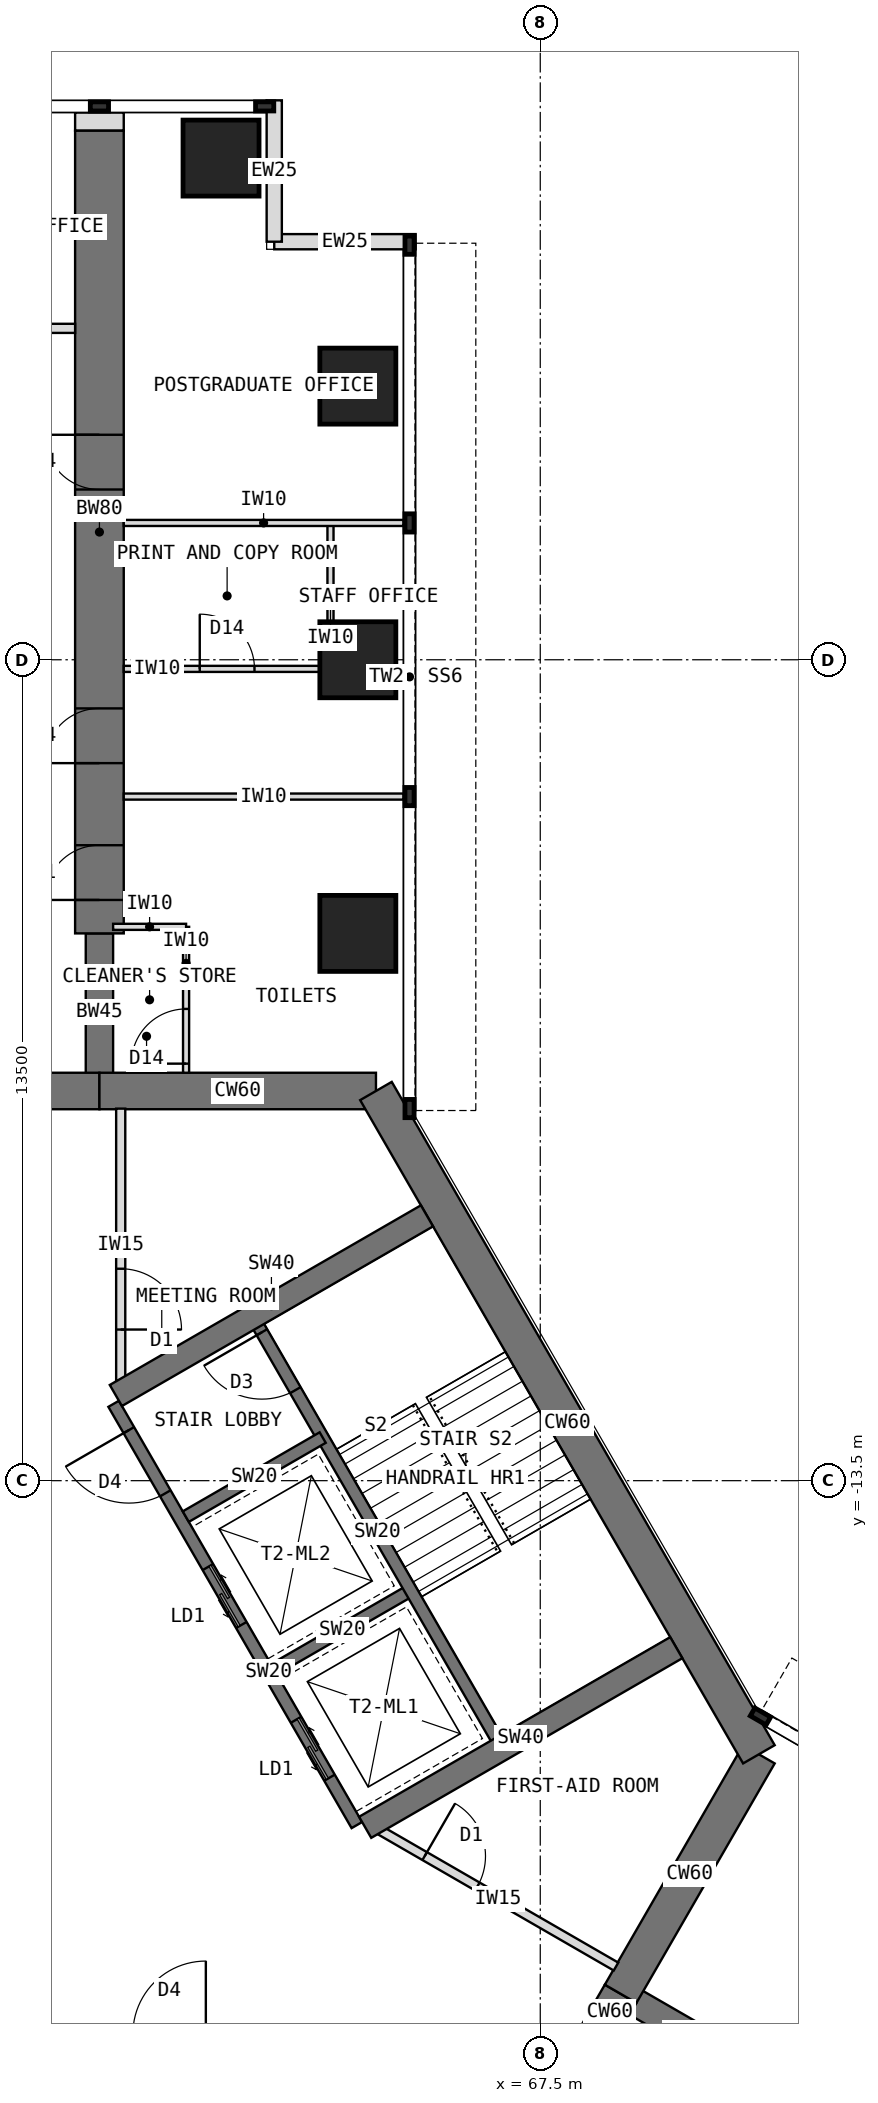
"""IFC4 building model, lengths in metres.
Left out: names, types, materials, properties, quantities, classifications, styles, units other than length and angle.
Written with IfcOpenShell. Run it as: python <this file> out.ifc"""

import sys

from ifc_helpers import new_model, si_unit, direction, frame, frame_2d, origin, origin_2d, place, context, subcontext, project, spatial, rectangle, extrude, element, fill, save


model = new_model("IFC4")
c1 = context("Model", 3, precision=1e-05, world=origin(), true_north=direction((0.0, 1.0)))
c2 = subcontext(c1, "Body", "Model", "MODEL_VIEW")
j1 = project(units=[si_unit("LENGTHUNIT", "METRE"), si_unit("PLANEANGLEUNIT", "RADIAN")], contexts=[c1])
p1 = place(None, origin())
s1 = spatial("IfcSite", under=j1, at=p1, CompositionType="ELEMENT")
p2 = place(p1, origin())
s2 = spatial("IfcBuilding", under=s1, at=p2, CompositionType="ELEMENT")
p3 = place(p2, frame((0.0, 0.0, 161.5)))
s3 = spatial("IfcBuildingStorey", under=s2, at=p3, CompositionType="ELEMENT", Elevation=161.5)
p4 = place(p3, frame((64.798, -7.092, 0.0), z_axis=(0.0, 0.0, 1.0), x_axis=(-1.0, 0.0, 0.0)))
e1 = element("IfcWall", 1, at=p4, inside=s3, PredefinedType="SHEAR", context=c2, shape_type="SweptSolid", body=[
    extrude(rectangle(XDim=4.548, YDim=0.6, at=frame_2d((2.274, 0.0))), origin(), (0.0, 0.0, 1.0), 4.0),
])
p5 = place(p3, frame((60.25, -7.092, 0.0), z_axis=(0.0, 0.0, 1.0), x_axis=(-1.0, 0.0, 0.0)))
e2 = element("IfcWall", 2, at=p5, inside=s3, PredefinedType="SHEAR", context=c2, shape_type="SweptSolid", body=[
    extrude(rectangle(XDim=3.5, YDim=0.6, at=frame_2d((1.75, 0.0))), origin(), (0.0, 0.0, 1.0), 4.0),
])
p6 = place(p5, frame((0.85, 0.0, 0.0)))
e3 = element("IfcOpeningElement", 3, at=p6, cuts=e2, PredefinedType="OPENING", context=c2, shape_type="SweptSolid", body=[
    extrude(rectangle(XDim=1.8, YDim=2.1, at=frame_2d((0.9, 1.05))), frame((0.0, 0.31, 0.0), z_axis=(0.0, -1.0, 0.0), x_axis=(1.0, 0.0, 0.0)), (0.0, 0.0, 1.0), 0.62),
])
p7 = place(p3, frame((67.072, -24.97, 0.0), z_axis=(0.0, 0.0, 1.0), x_axis=(0.500010275428, 0.866019471182, 0.0)))
e4 = element("IfcWall", 4, at=p7, inside=s3, PredefinedType="SHEAR", context=c2, shape_type="SweptSolid", body=[
    extrude(rectangle(XDim=3.5, YDim=0.6, at=frame_2d((1.75, 0.0))), origin(), (0.0, 0.0, 1.0), 4.0),
])
p8 = place(p7, frame((0.85, 0.0, 0.0)))
e5 = element("IfcOpeningElement", 5, at=p8, cuts=e4, PredefinedType="OPENING", context=c2, shape_type="SweptSolid", body=[
    extrude(rectangle(XDim=1.8, YDim=2.1, at=frame_2d((0.9, 1.05))), frame((0.0, 0.31, 0.0), z_axis=(0.0, -1.0, 0.0), x_axis=(1.0, 0.0, 0.0)), (0.0, 0.0, 1.0), 0.62),
])
p9 = place(p3, frame((68.822, -21.939, 0.0), z_axis=(0.0, 0.0, 1.0), x_axis=(0.500024481964, 0.866011268655, 0.0)))
e6 = element("IfcWall", 6, at=p9, inside=s3, PredefinedType="SHEAR", context=c2, shape_type="SweptSolid", body=[
    extrude(rectangle(XDim=4.548, YDim=0.6, at=frame_2d((2.274, 0.0))), origin(), (0.0, 0.0, 1.0), 4.0),
])
p10 = place(p3, frame((71.096, -18.0, 0.0), z_axis=(0.0, 0.0, 1.0), x_axis=(-0.500005998175, 0.866021940709, 0.0)))
e7 = element("IfcWall", 7, at=p10, inside=s3, PredefinedType="SHEAR", context=c2, shape_type="SweptSolid", body=[
    extrude(rectangle(XDim=12.596, YDim=0.6, at=frame_2d((6.298, 0.0))), origin(), (0.0, 0.0, 1.0), 4.0),
])
p11 = place(p3, frame((60.25, -7.092, 0.0), z_axis=(0.0, 0.0, 1.0), x_axis=(0.0, 1.0, 0.0)))
e8 = element("IfcWall", 8, at=p11, inside=s3, PredefinedType="SHEAR", context=c2, shape_type="SweptSolid", body=[
    extrude(rectangle(XDim=2.592, YDim=0.45, at=frame_2d((1.296, 0.0))), origin(), (0.0, 0.0, 1.0), 4.0),
])
p12 = place(p3, frame((60.25, -4.5, 0.0), z_axis=(0.0, 0.0, 1.0), x_axis=(0.0, 1.0, 0.0)))
e9 = element("IfcWall", 9, at=p12, inside=s3, PredefinedType="SHEAR", context=c2, shape_type="SweptSolid", body=[
    extrude(rectangle(XDim=13.2, YDim=0.8, at=frame_2d((6.6, 0.0))), origin(), (0.0, 0.0, 1.0), 4.0),
])
p13 = place(p12, frame((0.55, 0.0, 0.0)))
e10 = element("IfcOpeningElement", 10, at=p13, cuts=e9, PredefinedType="OPENING", context=c2, shape_type="SweptSolid", body=[
    extrude(rectangle(XDim=0.9, YDim=2.1, at=frame_2d((0.45, 1.05))), frame((0.0, 0.41, 0.0), z_axis=(0.0, -1.0, 0.0), x_axis=(1.0, 0.0, 0.0)), (0.0, 0.0, 1.0), 0.82),
])
p14 = place(p12, frame((2.8, 0.0, 0.0)))
e11 = element("IfcOpeningElement", 11, at=p14, cuts=e9, PredefinedType="OPENING", context=c2, shape_type="SweptSolid", body=[
    extrude(rectangle(XDim=0.9, YDim=2.1, at=frame_2d((0.45, 1.05))), frame((0.0, 0.41, 0.0), z_axis=(0.0, -1.0, 0.0), x_axis=(1.0, 0.0, 0.0)), (0.0, 0.0, 1.0), 0.82),
])
p15 = place(p12, frame((7.3, 0.0, 0.0)))
e12 = element("IfcOpeningElement", 12, at=p15, cuts=e9, PredefinedType="OPENING", context=c2, shape_type="SweptSolid", body=[
    extrude(rectangle(XDim=0.9, YDim=2.1, at=frame_2d((0.45, 1.05))), frame((0.0, 0.41, 0.0), z_axis=(0.0, -1.0, 0.0), x_axis=(1.0, 0.0, 0.0)), (0.0, 0.0, 1.0), 0.82),
])
p16 = place(p3, frame((68.822, -21.939, 0.0), z_axis=(0.0, 0.0, 1.0), x_axis=(0.866072649678, -0.499918158782, 0.0)))
e13 = element("IfcWall", 13, at=p16, inside=s3, PredefinedType="SHEAR", context=c2, shape_type="SweptSolid", body=[
    extrude(rectangle(XDim=2.592, YDim=0.45, at=frame_2d((1.296, 0.0))), origin(), (0.0, 0.0, 1.0), 4.0),
])
for number, where, z_axis, x_axis in (
    (14, (64.5, -4.5, 0.0), (0.0, 0.0, 1.0), (1.0, 0.0, 0.0)),
    (15, (64.5, 0.0, 0.0), (0.0, 0.0, 1.0), (1.0, 0.0, 0.0)),
    (16, (64.5, 4.5, 0.0), (0.0, 0.0, 1.0), (1.0, 0.0, 0.0)),
    (17, (62.25, 8.25, 0.0), (0.0, 0.0, 1.0), (1.0, 0.0, 0.0)),
):
    element("IfcColumn", number, at=place(p3, frame(where, z_axis=z_axis, x_axis=x_axis)), inside=s3, PredefinedType="COLUMN", context=c2, shape_type="SweptSolid", body=[
        extrude(rectangle(XDim=1.25, YDim=1.25, at=origin_2d()), origin(), (0.0, 0.0, 1.0), 4.0),
    ])
for number, where, z_axis, x_axis in (
    (18, (65.45, 6.875, 0.0), (0.0, 0.0, 1.0), (-1.0, 0.0, 0.0)),
    (19, (63.125, 6.875, 0.0), (0.0, 0.0, 1.0), (0.0, 1.0, 0.0)),
):
    element("IfcWall", number, at=place(p3, frame(where, z_axis=z_axis, x_axis=x_axis)), inside=s3, PredefinedType="STANDARD", context=c2, shape_type="SweptSolid", body=[
        extrude(rectangle(XDim=2.325, YDim=0.25, at=frame_2d((1.163, 0.0))), origin(), (0.0, 0.0, 1.0), 3.7),
    ])
p17 = place(p3, frame((60.25, 8.7, 0.0), z_axis=(0.0, 0.0, 1.0), x_axis=(0.0, 1.0, 0.0)))
e20 = element("IfcWall", 20, at=p17, inside=s3, PredefinedType="PARTITIONING", context=c2, shape_type="SweptSolid", body=[
    extrude(rectangle(XDim=0.3, YDim=0.8, at=frame_2d((0.15, 0.0))), origin(), (0.0, 0.0, 1.0), 3.7),
])
p18 = place(p3, frame((64.484, -19.164, 0.0), z_axis=(0.0, 0.0, 1.0), x_axis=(-0.49999894854, 0.866026010844, 0.0)))
e21 = element("IfcWall", 21, at=p18, inside=s3, PredefinedType="SHEAR", context=c2, shape_type="SweptSolid", body=[
    extrude(rectangle(XDim=8.0, YDim=0.2, at=frame_2d((4.0, 0.0))), origin(), (0.0, 0.0, 1.0), 4.0),
])
p19 = place(p18, frame((6.3, 0.0, 0.0)))
e22 = element("IfcOpeningElement", 22, at=p19, cuts=e21, PredefinedType="OPENING", context=c2, shape_type="SweptSolid", body=[
    extrude(rectangle(XDim=1.2, YDim=2.1, at=frame_2d((0.6, 1.05))), frame((0.0, 0.11, 0.0), z_axis=(0.0, -1.0, 0.0), x_axis=(1.0, 0.0, 0.0)), (0.0, 0.0, 1.0), 0.22),
])
p20 = place(p18, frame((0.9, 0.0, 0.0)))
e23 = element("IfcOpeningElement", 23, at=p20, cuts=e21, PredefinedType="OPENING", context=c2, shape_type="SweptSolid", body=[
    extrude(rectangle(XDim=1.1, YDim=2.2, at=frame_2d((0.55, 1.1))), frame((0.0, 0.11, 0.0), z_axis=(0.0, -1.0, 0.0), x_axis=(1.0, 0.0, 0.0)), (0.0, 0.0, 1.0), 0.22),
])
p21 = place(p18, frame((3.8, 0.0, 0.0)))
e24 = element("IfcOpeningElement", 24, at=p21, cuts=e21, PredefinedType="OPENING", context=c2, shape_type="SweptSolid", body=[
    extrude(rectangle(XDim=1.1, YDim=2.2, at=frame_2d((0.55, 1.1))), frame((0.0, 0.11, 0.0), z_axis=(0.0, -1.0, 0.0), x_axis=(1.0, 0.0, 0.0)), (0.0, 0.0, 1.0), 0.22),
])
p22 = place(p3, frame((63.12, -16.603, 0.0), z_axis=(0.0, 0.0, 1.0), x_axis=(0.866062058628, 0.499936506574, 0.0)))
e25 = element("IfcWall", 25, at=p22, inside=s3, PredefinedType="SHEAR", context=c2, shape_type="SweptSolid", body=[
    extrude(rectangle(XDim=2.6, YDim=0.2, at=frame_2d((1.3, 0.0))), origin(), (0.0, 0.0, 1.0), 4.0),
])
p23 = place(p3, frame((61.67, -14.091, 0.0), z_axis=(0.0, 0.0, 1.0), x_axis=(0.86603858612, 0.49997716683, 0.0)))
e26 = element("IfcWall", 26, at=p23, inside=s3, PredefinedType="SHEAR", context=c2, shape_type="SweptSolid", body=[
    extrude(rectangle(XDim=2.6, YDim=0.2, at=frame_2d((1.3, 0.0))), origin(), (0.0, 0.0, 1.0), 4.0),
])
p24 = place(p3, frame((66.822, -17.814, 0.0), z_axis=(0.0, 0.0, 1.0), x_axis=(-0.49999894854, 0.866026010844, 0.0)))
e27 = element("IfcWall", 27, at=p24, inside=s3, PredefinedType="SHEAR", context=c2, shape_type="SweptSolid", body=[
    extrude(rectangle(XDim=8.0, YDim=0.2, at=frame_2d((4.0, 0.0))), origin(), (0.0, 0.0, 1.0), 4.0),
])
p25 = place(p24, frame((6.7, 0.0, 0.0)))
e28 = element("IfcOpeningElement", 28, at=p25, cuts=e27, PredefinedType="OPENING", context=c2, shape_type="SweptSolid", body=[
    extrude(rectangle(XDim=1.1, YDim=2.1, at=frame_2d((0.55, 1.05))), frame((0.0, 0.11, 0.0), z_axis=(0.0, -1.0, 0.0), x_axis=(1.0, 0.0, 0.0)), (0.0, 0.0, 1.0), 0.22),
])
p26 = place(p3, frame((60.52, -12.099, 0.0), z_axis=(0.0, 0.0, 1.0), x_axis=(0.866009424208, 0.500027676417, 0.0)))
e29 = element("IfcWall", 29, at=p26, inside=s3, PredefinedType="SHEAR", context=c2, shape_type="SweptSolid", body=[
    extrude(rectangle(XDim=5.908, YDim=0.4, at=frame_2d((2.954, 0.0))), origin(), (0.0, 0.0, 1.0), 4.0),
])
p27 = place(p3, frame((64.62, -19.201, 0.0), z_axis=(0.0, 0.0, 1.0), x_axis=(0.866027317282, 0.49999668571, 0.0)))
e30 = element("IfcWall", 30, at=p27, inside=s3, PredefinedType="SHEAR", context=c2, shape_type="SweptSolid", body=[
    extrude(rectangle(XDim=5.908, YDim=0.4, at=frame_2d((2.954, 0.0))), origin(), (0.0, 0.0, 1.0), 4.0),
])
for number, where, z_axis, x_axis in (
    (31, (60.65, -2.25, 0.0), (0.0, 0.0, 1.0), (1.0, 0.0, 0.0)),
    (32, (60.65, 2.25, 0.0), (0.0, 0.0, 1.0), (1.0, 0.0, 0.0)),
):
    element("IfcWall", number, at=place(p3, frame(where, z_axis=z_axis, x_axis=x_axis)), inside=s3, PredefinedType="PARTITIONING", context=c2, shape_type="SweptSolid", body=[
        extrude(rectangle(XDim=4.6, YDim=0.1, at=frame_2d((2.3, 0.0))), origin(), (0.0, 0.0, 1.0), 3.7),
    ])
p28 = place(p3, frame((64.05, -0.15, 0.0), z_axis=(0.0, 0.0, 1.0), x_axis=(0.0, 1.0, 0.0)))
e33 = element("IfcWall", 33, at=p28, inside=s3, PredefinedType="PARTITIONING", context=c2, shape_type="SweptSolid", body=[
    extrude(rectangle(XDim=2.4, YDim=0.1, at=frame_2d((1.2, 0.0))), origin(), (0.0, 0.0, 1.0), 3.7),
])
p29 = place(p3, frame((60.65, -0.15, 0.0), z_axis=(0.0, 0.0, 1.0), x_axis=(1.0, 0.0, 0.0)))
e34 = element("IfcWall", 34, at=p29, inside=s3, PredefinedType="PARTITIONING", context=c2, shape_type="SweptSolid", body=[
    extrude(rectangle(XDim=3.4, YDim=0.1, at=frame_2d((1.7, 0.0))), origin(), (0.0, 0.0, 1.0), 3.7),
])
p30 = place(p29, frame((1.25, 0.0, 0.0)))
e35 = element("IfcOpeningElement", 35, at=p30, cuts=e34, PredefinedType="OPENING", context=c2, shape_type="SweptSolid", body=[
    extrude(rectangle(XDim=0.9, YDim=2.1, at=frame_2d((0.45, 1.05))), frame((0.0, 0.06, 0.0), z_axis=(0.0, -1.0, 0.0), x_axis=(1.0, 0.0, 0.0)), (0.0, 0.0, 1.0), 0.12),
])
p31 = place(p3, frame((61.675, -6.792, 0.0), z_axis=(0.0, 0.0, 1.0), x_axis=(0.0, 1.0, 0.0)))
e36 = element("IfcWall", 36, at=p31, inside=s3, PredefinedType="PARTITIONING", context=c2, shape_type="SweptSolid", body=[
    extrude(rectangle(XDim=2.4, YDim=0.1, at=frame_2d((1.2, 0.0))), origin(), (0.0, 0.0, 1.0), 3.7),
])
p32 = place(p31, frame((0.15, 0.0, 0.0)))
e37 = element("IfcOpeningElement", 37, at=p32, cuts=e36, PredefinedType="OPENING", context=c2, shape_type="SweptSolid", body=[
    extrude(rectangle(XDim=0.9, YDim=2.1, at=frame_2d((0.45, 1.05))), frame((0.0, 0.06, 0.0), z_axis=(0.0, -1.0, 0.0), x_axis=(1.0, 0.0, 0.0)), (0.0, 0.0, 1.0), 0.12),
])
p33 = place(p3, frame((60.475, -4.392, 0.0), z_axis=(0.0, 0.0, 1.0), x_axis=(1.0, 0.0, 0.0)))
e38 = element("IfcWall", 38, at=p33, inside=s3, PredefinedType="PARTITIONING", context=c2, shape_type="SweptSolid", body=[
    extrude(rectangle(XDim=1.2, YDim=0.1, at=frame_2d((0.6, 0.0))), origin(), (0.0, 0.0, 1.0), 3.7),
])
p34 = place(p3, frame((60.6, -7.382, 0.0), z_axis=(0.0, 0.0, 1.0), x_axis=(0.0, -1.0, 0.0)))
e39 = element("IfcWall", 39, at=p34, inside=s3, PredefinedType="PARTITIONING", context=c2, shape_type="SweptSolid", body=[
    extrude(rectangle(XDim=4.476, YDim=0.15, at=frame_2d((2.238, 0.0))), origin(), (0.0, 0.0, 1.0), 3.7),
])
p35 = place(p34, frame((2.633, 0.0, 0.0)))
e40 = element("IfcOpeningElement", 40, at=p35, cuts=e39, PredefinedType="OPENING", context=c2, shape_type="SweptSolid", body=[
    extrude(rectangle(XDim=1.0, YDim=2.1, at=frame_2d((0.5, 1.05))), frame((0.0, 0.085, 0.0), z_axis=(0.0, -1.0, 0.0), x_axis=(1.0, 0.0, 0.0)), (0.0, 0.0, 1.0), 0.17),
])
p36 = place(p3, frame((64.87, -19.253, 0.0), z_axis=(0.0, 0.0, 1.0), x_axis=(0.866025707867, -0.499999473313, 0.0)))
e41 = element("IfcWall", 41, at=p36, inside=s3, PredefinedType="PARTITIONING", context=c2, shape_type="SweptSolid", body=[
    extrude(rectangle(XDim=4.476, YDim=0.15, at=frame_2d((2.238, 0.0))), origin(), (0.0, 0.0, 1.0), 3.7),
])
p37 = place(p36, frame((0.843, 0.0, 0.0)))
e42 = element("IfcOpeningElement", 42, at=p37, cuts=e41, PredefinedType="OPENING", context=c2, shape_type="SweptSolid", body=[
    extrude(rectangle(XDim=1.0, YDim=2.1, at=frame_2d((0.5, 1.05))), frame((0.0, 0.085, 0.0), z_axis=(0.0, -1.0, 0.0), x_axis=(1.0, 0.0, 0.0)), (0.0, 0.0, 1.0), 0.17),
])
p38 = place(p3, frame((59.85, 5.45, 0.0), z_axis=(0.0, 0.0, 1.0), x_axis=(-1.0, 0.0, 0.0)))
e43 = element("IfcWall", 43, at=p38, inside=s3, PredefinedType="PARTITIONING", context=c2, shape_type="SweptSolid", body=[
    extrude(rectangle(XDim=2.7, YDim=0.15, at=frame_2d((1.35, 0.0))), origin(), (0.0, 0.0, 1.0), 3.7),
])
p39 = place(p38, frame((0.85, 0.0, 0.0)))
e44 = element("IfcOpeningElement", 44, at=p39, cuts=e43, PredefinedType="OPENING", context=c2, shape_type="SweptSolid", body=[
    extrude(rectangle(XDim=1.0, YDim=2.1, at=frame_2d((0.5, 1.05))), frame((0.0, 0.085, 0.0), z_axis=(0.0, -1.0, 0.0), x_axis=(1.0, 0.0, 0.0)), (0.0, 0.0, 1.0), 0.17),
])
p40 = place(p19, origin())
e45 = element("IfcDoor", 45, at=p40, inside=s3, OperationType="SINGLE_SWING_RIGHT", PredefinedType="DOOR", context=c2, shape_type="SweptSolid", body=[
    extrude(rectangle(XDim=1.2, YDim=2.1, at=frame_2d((0.6, 1.05))), frame((0.0, 0.025, 0.0), z_axis=(0.0, -1.0, 0.0), x_axis=(1.0, 0.0, 0.0)), (0.0, 0.0, 1.0), 0.05),
])
fill(e22, e45)
p41 = place(p20, origin())
e46 = element("IfcDoor", 46, at=p41, inside=s3, OperationType="DOUBLE_DOOR_SLIDING", PredefinedType="DOOR", context=c2, shape_type="SweptSolid", body=[
    extrude(rectangle(XDim=1.1, YDim=2.2, at=frame_2d((0.55, 1.1))), frame((0.0, 0.025, 0.0), z_axis=(0.0, -1.0, 0.0), x_axis=(1.0, 0.0, 0.0)), (0.0, 0.0, 1.0), 0.05),
])
fill(e23, e46)
p42 = place(p21, origin())
e47 = element("IfcDoor", 47, at=p42, inside=s3, OperationType="DOUBLE_DOOR_SLIDING", PredefinedType="DOOR", context=c2, shape_type="SweptSolid", body=[
    extrude(rectangle(XDim=1.1, YDim=2.2, at=frame_2d((0.55, 1.1))), frame((0.0, 0.025, 0.0), z_axis=(0.0, -1.0, 0.0), x_axis=(1.0, 0.0, 0.0)), (0.0, 0.0, 1.0), 0.05),
])
fill(e24, e47)
p43 = place(p25, origin())
e48 = element("IfcDoor", 48, at=p43, inside=s3, OperationType="SINGLE_SWING_RIGHT", PredefinedType="DOOR", context=c2, shape_type="SweptSolid", body=[
    extrude(rectangle(XDim=1.1, YDim=2.1, at=frame_2d((0.55, 1.05))), frame((0.0, 0.025, 0.0), z_axis=(0.0, -1.0, 0.0), x_axis=(1.0, 0.0, 0.0)), (0.0, 0.0, 1.0), 0.05),
])
fill(e28, e48)
p44 = place(p30, origin())
e49 = element("IfcDoor", 49, at=p44, inside=s3, OperationType="SINGLE_SWING_LEFT", PredefinedType="DOOR", context=c2, shape_type="SweptSolid", body=[
    extrude(rectangle(XDim=0.9, YDim=2.1, at=frame_2d((0.45, 1.05))), frame((0.0, 0.025, 0.0), z_axis=(0.0, -1.0, 0.0), x_axis=(1.0, 0.0, 0.0)), (0.0, 0.0, 1.0), 0.05),
])
fill(e35, e49)
p45 = place(p32, origin())
e50 = element("IfcDoor", 50, at=p45, inside=s3, OperationType="SINGLE_SWING_LEFT", PredefinedType="DOOR", context=c2, shape_type="SweptSolid", body=[
    extrude(rectangle(XDim=0.9, YDim=2.1, at=frame_2d((0.45, 1.05))), frame((0.0, 0.025, 0.0), z_axis=(0.0, -1.0, 0.0), x_axis=(1.0, 0.0, 0.0)), (0.0, 0.0, 1.0), 0.05),
])
fill(e37, e50)
p46 = place(p37, origin())
e51 = element("IfcDoor", 51, at=p46, inside=s3, OperationType="SINGLE_SWING_LEFT", PredefinedType="DOOR", context=c2, shape_type="SweptSolid", body=[
    extrude(rectangle(XDim=1.0, YDim=2.1, at=frame_2d((0.5, 1.05))), frame((0.0, 0.025, 0.0), z_axis=(0.0, -1.0, 0.0), x_axis=(1.0, 0.0, 0.0)), (0.0, 0.0, 1.0), 0.05),
])
fill(e42, e51)
p47 = place(p35, origin())
e52 = element("IfcDoor", 52, at=p47, inside=s3, OperationType="SINGLE_SWING_RIGHT", PredefinedType="DOOR", context=c2, shape_type="SweptSolid", body=[
    extrude(rectangle(XDim=1.0, YDim=2.1, at=frame_2d((0.5, 1.05))), frame((0.0, 0.025, 0.0), z_axis=(0.0, -1.0, 0.0), x_axis=(1.0, 0.0, 0.0)), (0.0, 0.0, 1.0), 0.05),
])
fill(e40, e52)
p48 = place(p13, origin())
e53 = element("IfcDoor", 53, at=p48, inside=s3, OperationType="SINGLE_SWING_LEFT", PredefinedType="DOOR", context=c2, shape_type="SweptSolid", body=[
    extrude(rectangle(XDim=0.82, YDim=2.06, at=frame_2d((0.45, 1.03))), frame((0.0, 0.025, 0.0), z_axis=(0.0, -1.0, 0.0), x_axis=(1.0, 0.0, 0.0)), (0.0, 0.0, 1.0), 0.05),
    extrude(rectangle(XDim=0.04, YDim=2.1, at=frame_2d((0.02, 1.05))), frame((0.0, 0.4, 0.0), z_axis=(0.0, -1.0, 0.0), x_axis=(1.0, 0.0, 0.0)), (0.0, 0.0, 1.0), 0.8),
    extrude(rectangle(XDim=0.04, YDim=2.1, at=frame_2d((0.88, 1.05))), frame((0.0, 0.4, 0.0), z_axis=(0.0, -1.0, 0.0), x_axis=(1.0, 0.0, 0.0)), (0.0, 0.0, 1.0), 0.8),
    extrude(rectangle(XDim=0.82, YDim=0.04, at=frame_2d((0.45, 2.08))), frame((0.0, 0.4, 0.0), z_axis=(0.0, -1.0, 0.0), x_axis=(1.0, 0.0, 0.0)), (0.0, 0.0, 1.0), 0.8),
])
fill(e10, e53)
p49 = place(p14, origin())
e54 = element("IfcDoor", 54, at=p49, inside=s3, OperationType="SINGLE_SWING_LEFT", PredefinedType="DOOR", context=c2, shape_type="SweptSolid", body=[
    extrude(rectangle(XDim=0.82, YDim=2.06, at=frame_2d((0.45, 1.03))), frame((0.0, 0.025, 0.0), z_axis=(0.0, -1.0, 0.0), x_axis=(1.0, 0.0, 0.0)), (0.0, 0.0, 1.0), 0.05),
    extrude(rectangle(XDim=0.04, YDim=2.1, at=frame_2d((0.02, 1.05))), frame((0.0, 0.4, 0.0), z_axis=(0.0, -1.0, 0.0), x_axis=(1.0, 0.0, 0.0)), (0.0, 0.0, 1.0), 0.8),
    extrude(rectangle(XDim=0.04, YDim=2.1, at=frame_2d((0.88, 1.05))), frame((0.0, 0.4, 0.0), z_axis=(0.0, -1.0, 0.0), x_axis=(1.0, 0.0, 0.0)), (0.0, 0.0, 1.0), 0.8),
    extrude(rectangle(XDim=0.82, YDim=0.04, at=frame_2d((0.45, 2.08))), frame((0.0, 0.4, 0.0), z_axis=(0.0, -1.0, 0.0), x_axis=(1.0, 0.0, 0.0)), (0.0, 0.0, 1.0), 0.8),
])
fill(e11, e54)
p50 = place(p15, origin())
e55 = element("IfcDoor", 55, at=p50, inside=s3, OperationType="SINGLE_SWING_RIGHT", PredefinedType="DOOR", context=c2, shape_type="SweptSolid", body=[
    extrude(rectangle(XDim=0.82, YDim=2.06, at=frame_2d((0.45, 1.03))), frame((0.0, 0.025, 0.0), z_axis=(0.0, -1.0, 0.0), x_axis=(1.0, 0.0, 0.0)), (0.0, 0.0, 1.0), 0.05),
    extrude(rectangle(XDim=0.04, YDim=2.1, at=frame_2d((0.02, 1.05))), frame((0.0, 0.4, 0.0), z_axis=(0.0, -1.0, 0.0), x_axis=(1.0, 0.0, 0.0)), (0.0, 0.0, 1.0), 0.8),
    extrude(rectangle(XDim=0.04, YDim=2.1, at=frame_2d((0.88, 1.05))), frame((0.0, 0.4, 0.0), z_axis=(0.0, -1.0, 0.0), x_axis=(1.0, 0.0, 0.0)), (0.0, 0.0, 1.0), 0.8),
    extrude(rectangle(XDim=0.82, YDim=0.04, at=frame_2d((0.45, 2.08))), frame((0.0, 0.4, 0.0), z_axis=(0.0, -1.0, 0.0), x_axis=(1.0, 0.0, 0.0)), (0.0, 0.0, 1.0), 0.8),
])
fill(e12, e55)
save(model, sys.argv[1])
